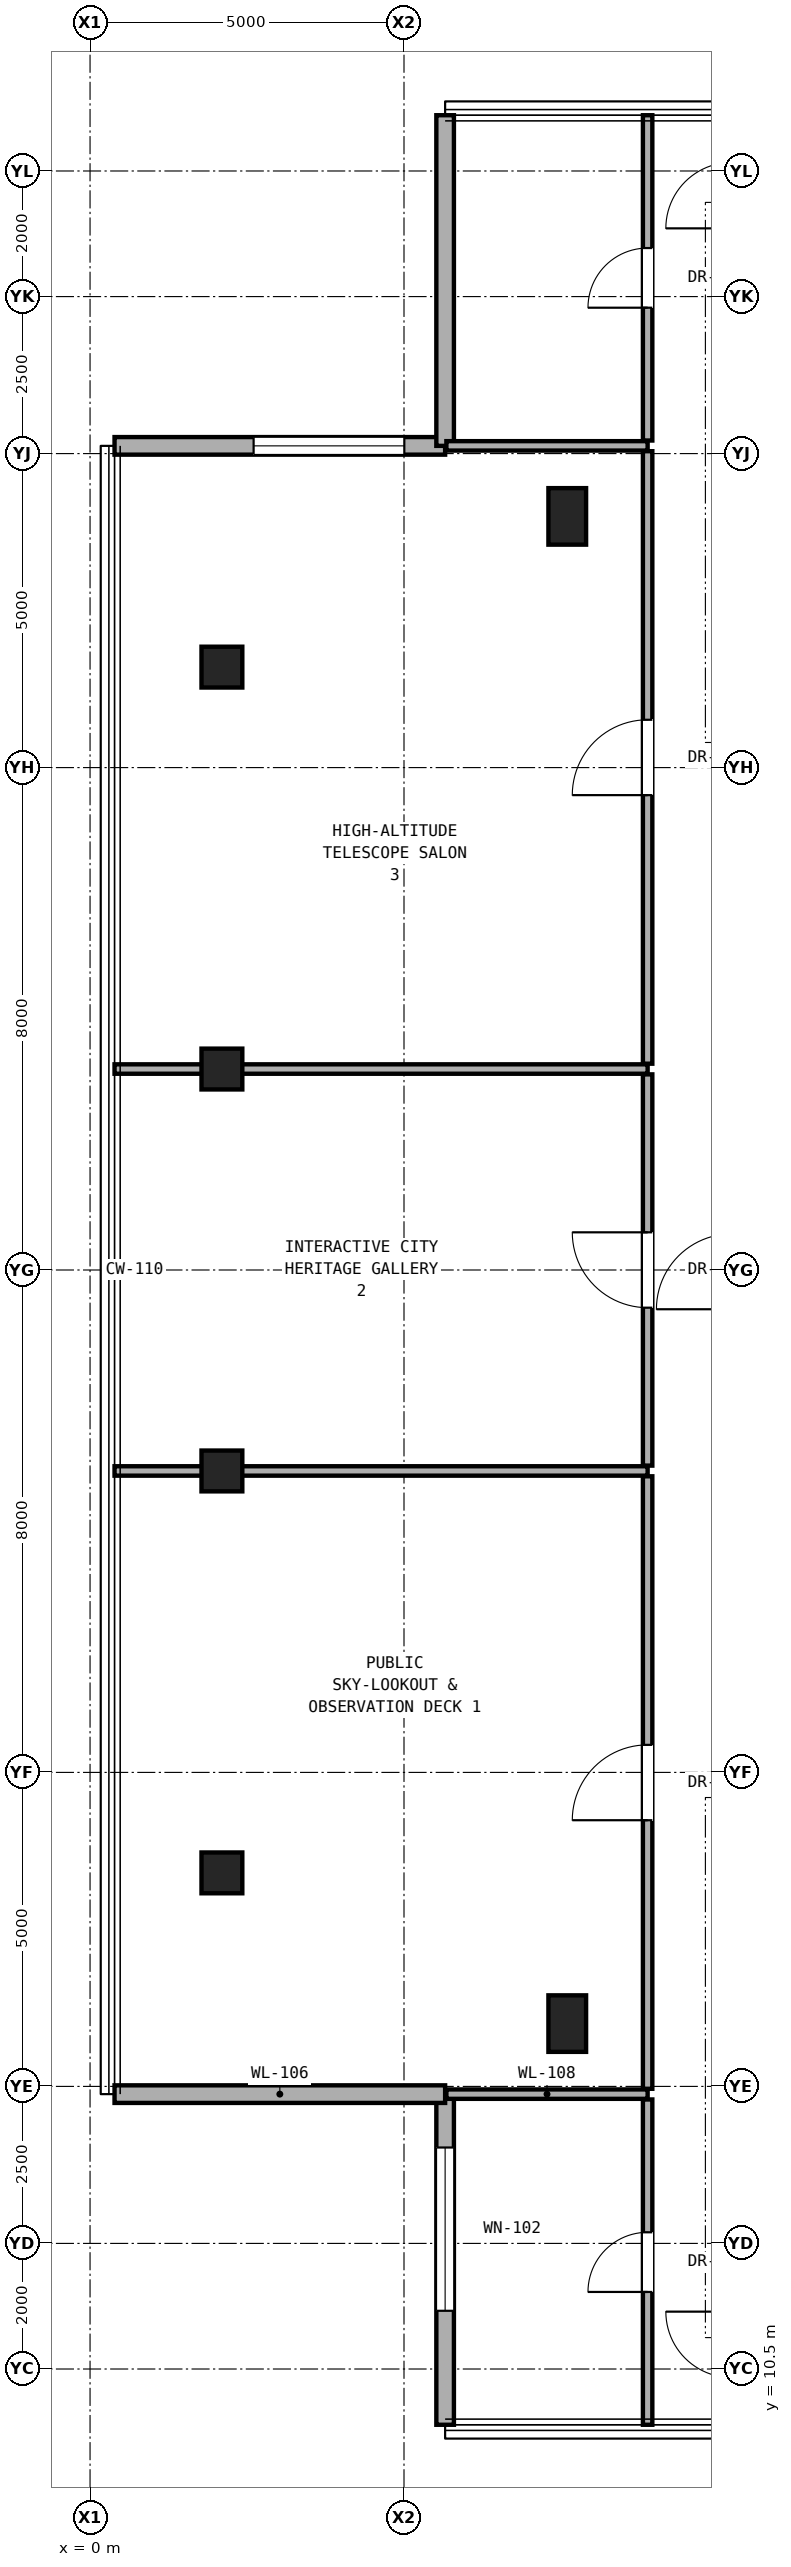
"""IFC4 building model, lengths in metres.
Left out: names, types, materials, properties, quantities, classifications, styles, units other than length and angle.
Written with IfcOpenShell. Run it as: python <this file> out.ifc"""

import sys

from ifc_helpers import new_model, si_unit, direction, frame, frame_2d, origin, origin_2d, place, context, subcontext, project, spatial, rectangle, hollow_rectangle, extrude, element, fill, save


model = new_model("IFC4")
c1 = context("Model", 3, precision=1e-05, world=origin(), true_north=direction((0.0, 1.0)))
c2 = subcontext(c1, "Body", "Model", "MODEL_VIEW")
j1 = project(units=[si_unit("LENGTHUNIT", "METRE"), si_unit("PLANEANGLEUNIT", "RADIAN")], contexts=[c1])
p1 = place(None, origin())
s1 = spatial("IfcSite", under=j1, at=p1, CompositionType="ELEMENT")
p2 = place(p1, origin())
s2 = spatial("IfcBuilding", under=s1, at=p2, CompositionType="ELEMENT")
p3 = place(p2, frame((0.0, 0.0, 252.7)))
s3 = spatial("IfcBuildingStorey", under=s2, at=p3, CompositionType="ELEMENT", Elevation=252.7)
for number, where, z_axis, x_axis in (
    (1, (2.1, 18.4, 0.0), (0.0, 0.0, 1.0), (1.0, 0.0, 0.0)),
    (2, (2.1, 24.8, 0.0), (0.0, 0.0, 1.0), (1.0, 0.0, 0.0)),
    (3, (2.1, 31.2, 0.0), (0.0, 0.0, 1.0), (1.0, 0.0, 0.0)),
    (4, (2.1, 37.6, 0.0), (0.0, 0.0, 1.0), (1.0, 0.0, 0.0)),
):
    element("IfcColumn", number, at=place(p3, frame(where, z_axis=z_axis, x_axis=x_axis)), inside=s3, PredefinedType="COLUMN", context=c2, shape_type="SweptSolid", body=[
        extrude(hollow_rectangle(XDim=0.65, YDim=0.65, WallThickness=0.036, at=origin_2d()), origin(), (0.0, 0.0, 1.0), 3.6),
    ])
for number, where, z_axis, x_axis in (
    (5, (7.6, 16.0, 0.0), (0.0, 0.0, 1.0), (1.0, 0.0, 0.0)),
    (6, (7.6, 40.0, 0.0), (0.0, 0.0, 1.0), (1.0, 0.0, 0.0)),
):
    element("IfcColumn", number, at=place(p3, frame(where, z_axis=z_axis, x_axis=x_axis)), inside=s3, PredefinedType="PILASTER", context=c2, shape_type="SweptSolid", body=[
        extrude(rectangle(XDim=0.6, YDim=0.9, at=origin_2d()), origin(), (0.0, 0.0, 1.0), 3.6),
    ])
p4 = place(p3, frame((5.655, 14.877, 0.0), z_axis=(0.0, 0.0, 1.0), x_axis=(0.0, -1.0, 0.0)))
e7 = element("IfcWall", 7, at=p4, inside=s3, PredefinedType="SOLIDWALL", context=c2, shape_type="SweptSolid", body=[
    extrude(rectangle(XDim=5.265, YDim=0.28, at=frame_2d((2.632, 0.0))), origin(), (0.0, 0.0, 1.0), 3.38),
])
p5 = place(p4, frame((0.85, 0.0, 0.63)))
e8 = element("IfcOpeningElement", 8, at=p5, cuts=e7, PredefinedType="OPENING", context=c2, shape_type="SweptSolid", body=[
    extrude(rectangle(XDim=2.6, YDim=2.6, at=frame_2d((1.3, 1.3))), frame((0.0, 0.15, 0.0), z_axis=(0.0, -1.0, 0.0), x_axis=(1.0, 0.0, 0.0)), (0.0, 0.0, 1.0), 0.3),
])
p6 = place(p3, frame((0.39, 14.877, 0.0), z_axis=(0.0, 0.0, 1.0), x_axis=(1.0, 0.0, 0.0)))
e9 = element("IfcWall", 9, at=p6, inside=s3, PredefinedType="SOLIDWALL", context=c2, shape_type="SweptSolid", body=[
    extrude(rectangle(XDim=5.265, YDim=0.28, at=frame_2d((2.633, 0.0))), origin(), (0.0, 0.0, 1.0), 3.38),
])
p7 = place(p3, frame((5.655, 41.123, 0.0), z_axis=(0.0, 0.0, 1.0), x_axis=(-1.0, 0.0, 0.0)))
e10 = element("IfcWall", 10, at=p7, inside=s3, PredefinedType="SOLIDWALL", context=c2, shape_type="SweptSolid", body=[
    extrude(rectangle(XDim=5.265, YDim=0.28, at=frame_2d((2.633, 0.0))), origin(), (0.0, 0.0, 1.0), 3.38),
])
p8 = place(p7, frame((0.65, 0.0, 0.85)))
e11 = element("IfcOpeningElement", 11, at=p8, cuts=e10, PredefinedType="OPENING", context=c2, shape_type="SweptSolid", body=[
    extrude(rectangle(XDim=2.4, YDim=2.35, at=frame_2d((1.2, 1.175))), frame((0.0, 0.15, 0.0), z_axis=(0.0, -1.0, 0.0), x_axis=(1.0, 0.0, 0.0)), (0.0, 0.0, 1.0), 0.3),
])
p9 = place(p3, frame((5.655, 46.388, 0.0), z_axis=(0.0, 0.0, 1.0), x_axis=(0.0, -1.0, 0.0)))
e12 = element("IfcWall", 12, at=p9, inside=s3, PredefinedType="SOLIDWALL", context=c2, shape_type="SweptSolid", body=[
    extrude(rectangle(XDim=5.265, YDim=0.28, at=frame_2d((2.632, 0.0))), origin(), (0.0, 0.0, 1.0), 3.38),
])
p10 = place(p3, frame((5.675, 14.877, 0.0), z_axis=(0.0, 0.0, 1.0), x_axis=(1.0, 0.0, 0.0)))
e13 = element("IfcWall", 13, at=p10, inside=s3, PredefinedType="PARTITIONING", context=c2, shape_type="SweptSolid", body=[
    extrude(rectangle(XDim=3.205, YDim=0.15, at=frame_2d((1.603, 0.0))), origin(), (0.0, 0.0, 1.0), 3.4),
])
for number, where, z_axis, x_axis in (
    (14, (0.39, 24.8, 0.0), (0.0, 0.0, 1.0), (1.0, 0.0, 0.0)),
    (15, (0.39, 31.2, 0.0), (0.0, 0.0, 1.0), (1.0, 0.0, 0.0)),
):
    element("IfcWall", number, at=place(p3, frame(where, z_axis=z_axis, x_axis=x_axis)), inside=s3, PredefinedType="PARTITIONING", context=c2, shape_type="SweptSolid", body=[
        extrude(rectangle(XDim=8.49, YDim=0.15, at=frame_2d((4.245, 0.0))), origin(), (0.0, 0.0, 1.0), 2.619),
    ])
p11 = place(p3, frame((5.675, 41.123, 0.0), z_axis=(0.0, 0.0, 1.0), x_axis=(1.0, 0.0, 0.0)))
e16 = element("IfcWall", 16, at=p11, inside=s3, PredefinedType="PARTITIONING", context=c2, shape_type="SweptSolid", body=[
    extrude(rectangle(XDim=3.205, YDim=0.15, at=frame_2d((1.603, 0.0))), origin(), (0.0, 0.0, 1.0), 3.4),
])
p12 = place(p3, frame((8.88, 9.612, 0.0), z_axis=(0.0, 0.0, 1.0), x_axis=(0.0, 1.0, 0.0)))
e17 = element("IfcWall", 17, at=p12, inside=s3, PredefinedType="PARTITIONING", context=c2, shape_type="SweptSolid", body=[
    extrude(rectangle(XDim=5.18, YDim=0.15, at=frame_2d((2.59, 0.0))), origin(), (0.0, 0.0, 1.0), 3.4),
])
p13 = place(p12, frame((2.115, 0.0, 0.0)))
e18 = element("IfcOpeningElement", 18, at=p13, cuts=e17, PredefinedType="OPENING", context=c2, shape_type="SweptSolid", body=[
    extrude(rectangle(XDim=0.95, YDim=2.15, at=frame_2d((0.475, 1.075))), frame((0.0, 0.085, 0.0), z_axis=(0.0, -1.0, 0.0), x_axis=(1.0, 0.0, 0.0)), (0.0, 0.0, 1.0), 0.17),
])
p14 = place(p3, frame((8.88, 14.962, 0.0), z_axis=(0.0, 0.0, 1.0), x_axis=(0.0, 1.0, 0.0)))
e19 = element("IfcWall", 19, at=p14, inside=s3, PredefinedType="PARTITIONING", context=c2, shape_type="SweptSolid", body=[
    extrude(rectangle(XDim=9.753, YDim=0.15, at=frame_2d((4.876, 0.0))), origin(), (0.0, 0.0, 1.0), 2.696),
])
p15 = place(p14, frame((4.277, 0.0, 0.0)))
e20 = element("IfcOpeningElement", 20, at=p15, cuts=e19, PredefinedType="OPENING", context=c2, shape_type="SweptSolid", body=[
    extrude(rectangle(XDim=1.2, YDim=2.25, at=frame_2d((0.6, 1.125))), frame((0.0, 0.085, 0.0), z_axis=(0.0, -1.0, 0.0), x_axis=(1.0, 0.0, 0.0)), (0.0, 0.0, 1.0), 0.17),
])
p16 = place(p3, frame((8.88, 24.885, 0.0), z_axis=(0.0, 0.0, 1.0), x_axis=(0.0, 1.0, 0.0)))
e21 = element("IfcWall", 21, at=p16, inside=s3, PredefinedType="PARTITIONING", context=c2, shape_type="SweptSolid", body=[
    extrude(rectangle(XDim=6.23, YDim=0.15, at=frame_2d((3.115, 0.0))), origin(), (0.0, 0.0, 1.0), 2.696),
])
p17 = place(p16, frame((2.515, 0.0, 0.0)))
e22 = element("IfcOpeningElement", 22, at=p17, cuts=e21, PredefinedType="OPENING", context=c2, shape_type="SweptSolid", body=[
    extrude(rectangle(XDim=1.2, YDim=2.25, at=frame_2d((0.6, 1.125))), frame((0.0, 0.085, 0.0), z_axis=(0.0, -1.0, 0.0), x_axis=(1.0, 0.0, 0.0)), (0.0, 0.0, 1.0), 0.17),
])
p18 = place(p3, frame((8.88, 31.285, 0.0), z_axis=(0.0, 0.0, 1.0), x_axis=(0.0, 1.0, 0.0)))
e23 = element("IfcWall", 23, at=p18, inside=s3, PredefinedType="PARTITIONING", context=c2, shape_type="SweptSolid", body=[
    extrude(rectangle(XDim=9.753, YDim=0.15, at=frame_2d((4.876, 0.0))), origin(), (0.0, 0.0, 1.0), 2.696),
])
p19 = place(p18, frame((4.277, 0.0, 0.0)))
e24 = element("IfcOpeningElement", 24, at=p19, cuts=e23, PredefinedType="OPENING", context=c2, shape_type="SweptSolid", body=[
    extrude(rectangle(XDim=1.2, YDim=2.25, at=frame_2d((0.6, 1.125))), frame((0.0, 0.085, 0.0), z_axis=(0.0, -1.0, 0.0), x_axis=(1.0, 0.0, 0.0)), (0.0, 0.0, 1.0), 0.17),
])
p20 = place(p3, frame((8.88, 41.208, 0.0), z_axis=(0.0, 0.0, 1.0), x_axis=(0.0, 1.0, 0.0)))
e25 = element("IfcWall", 25, at=p20, inside=s3, PredefinedType="PARTITIONING", context=c2, shape_type="SweptSolid", body=[
    extrude(rectangle(XDim=5.18, YDim=0.15, at=frame_2d((2.59, 0.0))), origin(), (0.0, 0.0, 1.0), 3.4),
])
p21 = place(p20, frame((2.115, 0.0, 0.0)))
e26 = element("IfcOpeningElement", 26, at=p21, cuts=e25, PredefinedType="OPENING", context=c2, shape_type="SweptSolid", body=[
    extrude(rectangle(XDim=0.95, YDim=2.15, at=frame_2d((0.475, 1.075))), frame((0.0, 0.085, 0.0), z_axis=(0.0, -1.0, 0.0), x_axis=(1.0, 0.0, 0.0)), (0.0, 0.0, 1.0), 0.17),
])
p22 = place(p5, origin())
e27 = element("IfcWindow", 27, at=p22, inside=s3, PartitioningType="SINGLE_PANEL", PredefinedType="WINDOW", context=c2, shape_type="SweptSolid", body=[
    extrude(rectangle(XDim=2.6, YDim=2.6, at=frame_2d((1.3, 1.3))), frame((0.0, 0.03, 0.0), z_axis=(0.0, -1.0, 0.0), x_axis=(1.0, 0.0, 0.0)), (0.0, 0.0, 1.0), 0.06),
])
fill(e8, e27)
p23 = place(p8, origin())
e28 = element("IfcWindow", 28, at=p23, inside=s3, PartitioningType="SINGLE_PANEL", PredefinedType="WINDOW", context=c2, shape_type="SweptSolid", body=[
    extrude(rectangle(XDim=2.4, YDim=2.35, at=frame_2d((1.2, 1.175))), frame((0.0, 0.03, 0.0), z_axis=(0.0, -1.0, 0.0), x_axis=(1.0, 0.0, 0.0)), (0.0, 0.0, 1.0), 0.06),
])
fill(e11, e28)
p24 = place(p15, origin())
e29 = element("IfcDoor", 29, at=p24, inside=s3, OperationType="SINGLE_SWING_LEFT", PredefinedType="DOOR", context=c2, shape_type="SweptSolid", body=[
    extrude(rectangle(XDim=1.2, YDim=2.25, at=frame_2d((0.6, 1.125))), frame((0.0, 0.025, 0.0), z_axis=(0.0, -1.0, 0.0), x_axis=(1.0, 0.0, 0.0)), (0.0, 0.0, 1.0), 0.05),
])
fill(e20, e29)
p25 = place(p17, origin())
e30 = element("IfcDoor", 30, at=p25, inside=s3, OperationType="SINGLE_SWING_RIGHT", PredefinedType="DOOR", context=c2, shape_type="SweptSolid", body=[
    extrude(rectangle(XDim=1.2, YDim=2.25, at=frame_2d((0.6, 1.125))), frame((0.0, 0.025, 0.0), z_axis=(0.0, -1.0, 0.0), x_axis=(1.0, 0.0, 0.0)), (0.0, 0.0, 1.0), 0.05),
])
fill(e22, e30)
p26 = place(p19, origin())
e31 = element("IfcDoor", 31, at=p26, inside=s3, OperationType="SINGLE_SWING_LEFT", PredefinedType="DOOR", context=c2, shape_type="SweptSolid", body=[
    extrude(rectangle(XDim=1.2, YDim=2.25, at=frame_2d((0.6, 1.125))), frame((0.0, 0.025, 0.0), z_axis=(0.0, -1.0, 0.0), x_axis=(1.0, 0.0, 0.0)), (0.0, 0.0, 1.0), 0.05),
])
fill(e24, e31)
p27 = place(p13, origin())
e32 = element("IfcDoor", 32, at=p27, inside=s3, OperationType="SINGLE_SWING_LEFT", PredefinedType="DOOR", context=c2, shape_type="SweptSolid", body=[
    extrude(rectangle(XDim=0.95, YDim=2.15, at=frame_2d((0.475, 1.075))), frame((0.0, 0.025, 0.0), z_axis=(0.0, -1.0, 0.0), x_axis=(1.0, 0.0, 0.0)), (0.0, 0.0, 1.0), 0.05),
])
fill(e18, e32)
p28 = place(p21, origin())
e33 = element("IfcDoor", 33, at=p28, inside=s3, OperationType="SINGLE_SWING_LEFT", PredefinedType="DOOR", context=c2, shape_type="SweptSolid", body=[
    extrude(rectangle(XDim=0.95, YDim=2.15, at=frame_2d((0.475, 1.075))), frame((0.0, 0.025, 0.0), z_axis=(0.0, -1.0, 0.0), x_axis=(1.0, 0.0, 0.0)), (0.0, 0.0, 1.0), 0.05),
])
fill(e26, e33)
save(model, sys.argv[1])
